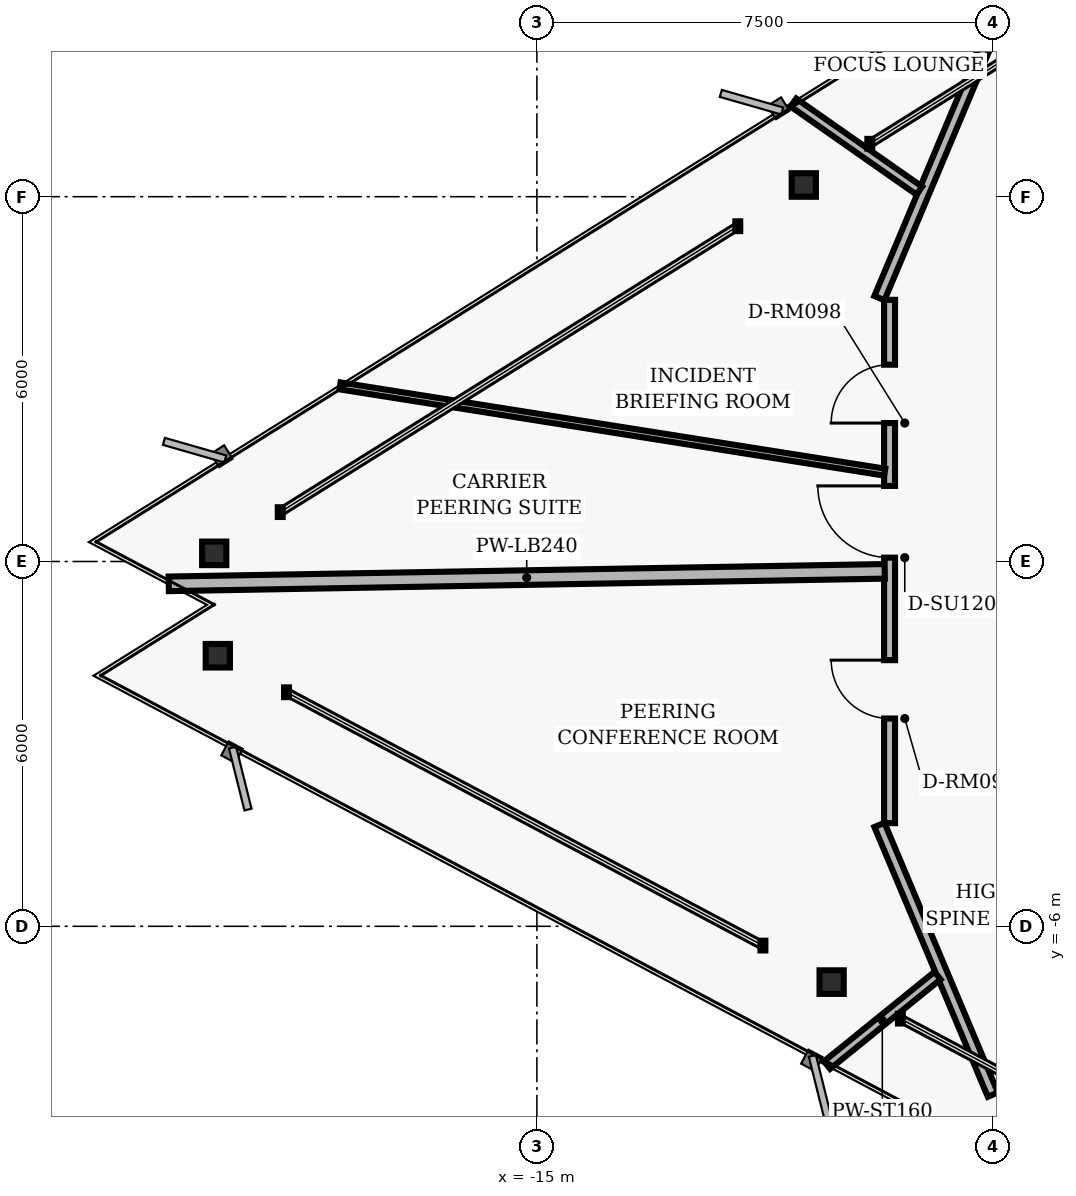
"""IFC4 building model, lengths in metres.
Left out: names, types, materials, properties, quantities, classifications, styles, units other than length and angle.
Written with IfcOpenShell. Run it as: python <this file> out.ifc"""

import sys

from ifc_helpers import new_model, si_unit, direction, frame, frame_2d, origin, origin_2d, place, context, subcontext, project, spatial, rectangle, i_section, extrude, element, fill, save


model = new_model("IFC4")
c1 = context("Model", 3, precision=1e-05, world=origin(), true_north=direction((0.0, 1.0)))
c2 = subcontext(c1, "Body", "Model", "MODEL_VIEW")
j1 = project(units=[si_unit("LENGTHUNIT", "METRE"), si_unit("PLANEANGLEUNIT", "RADIAN")], contexts=[c1])
p1 = place(None, origin())
s1 = spatial("IfcSite", under=j1, at=p1, CompositionType="ELEMENT")
p2 = place(p1, origin())
s2 = spatial("IfcBuilding", under=s1, at=p2, CompositionType="ELEMENT")
p3 = place(p2, frame((0.0, 0.0, 193.6)))
s3 = spatial("IfcBuildingStorey", under=s2, at=p3, CompositionType="ELEMENT", Elevation=193.6)
for number, where, z_axis, x_axis in (
    (1, (-10.611, 6.193, 0.0), (0.0, 0.0, 1.0), (1.0, 0.0, 0.0)),
    (2, (-20.307, 0.134, 0.0), (0.0, 0.0, 1.0), (1.0, 0.0, 0.0)),
    (3, (-20.248, -1.55, 0.0), (0.0, 0.0, 1.0), (1.0, 0.0, 0.0)),
    (4, (-10.153, -6.918, 0.0), (0.0, 0.0, 1.0), (1.0, 0.0, 0.0)),
):
    element("IfcColumn", number, at=place(p3, frame(where, z_axis=z_axis, x_axis=x_axis)), inside=s3, PredefinedType="COLUMN", context=c2, shape_type="SweptSolid", body=[
        extrude(i_section(OverallWidth=0.398, OverallDepth=0.387, WebThickness=0.021, FlangeThickness=0.033, FilletRadius=0.018, at=origin_2d()), origin(), (0.0, 0.0, 1.0), 3.04),
    ])
p4 = place(p3, frame((-7.501, -8.769, 0.0), z_axis=(0.0, 0.0, 1.0), x_axis=(-0.387573945081, 0.921838617706, 0.0)))
e5 = element("IfcWall", 5, at=p4, inside=s3, PredefinedType="PARTITIONING", context=c2, shape_type="SweptSolid", body=[
    extrude(rectangle(XDim=4.813, YDim=0.18, at=frame_2d((2.407, 0.0))), origin(), (0.0, 0.0, 1.0), 2.773),
])
p5 = place(p3, frame((-9.2, -4.303, 0.0), z_axis=(0.0, 0.0, 1.0), x_axis=(0.0, 1.0, 0.0)))
e6 = element("IfcWall", 6, at=p5, inside=s3, PredefinedType="PARTITIONING", context=c2, shape_type="SweptSolid", body=[
    extrude(rectangle(XDim=8.607, YDim=0.18, at=frame_2d((4.303, 0.0))), origin(), (0.0, 0.0, 1.0), 2.773),
])
p6 = place(p5, frame((1.721, 0.0, 0.0)))
e7 = element("IfcOpeningElement", 7, at=p6, cuts=e6, PredefinedType="OPENING", context=c2, shape_type="SweptSolid", body=[
    extrude(rectangle(XDim=0.96, YDim=2.02, at=frame_2d((0.48, 1.01))), frame((0.0, 0.1, 0.0), z_axis=(0.0, -1.0, 0.0), x_axis=(1.0, 0.0, 0.0)), (0.0, 0.0, 1.0), 0.2),
])
p7 = place(p5, frame((6.58, 0.0, 0.0)))
e8 = element("IfcOpeningElement", 8, at=p7, cuts=e6, PredefinedType="OPENING", context=c2, shape_type="SweptSolid", body=[
    extrude(rectangle(XDim=0.96, YDim=2.02, at=frame_2d((0.48, 1.01))), frame((0.0, 0.1, 0.0), z_axis=(0.0, -1.0, 0.0), x_axis=(1.0, 0.0, 0.0)), (0.0, 0.0, 1.0), 0.2),
])
p8 = place(p5, frame((4.367, 0.0, 0.0)))
e9 = element("IfcOpeningElement", 9, at=p8, cuts=e6, PredefinedType="OPENING", context=c2, shape_type="SweptSolid", body=[
    extrude(rectangle(XDim=1.18, YDim=2.02, at=frame_2d((0.59, 1.01))), frame((0.0, 0.1, 0.0), z_axis=(0.0, -1.0, 0.0), x_axis=(1.0, 0.0, 0.0)), (0.0, 0.0, 1.0), 0.2),
])
p9 = place(p3, frame((-9.367, 4.332, 0.0), z_axis=(0.0, 0.0, 1.0), x_axis=(0.387573945081, 0.921838617706, 0.0)))
e10 = element("IfcWall", 10, at=p9, inside=s3, PredefinedType="PARTITIONING", context=c2, shape_type="SweptSolid", body=[
    extrude(rectangle(XDim=4.813, YDim=0.18, at=frame_2d((2.407, 0.0))), origin(), (0.0, 0.0, 1.0), 2.773),
])
p10 = place(p3, frame((-9.28, -0.162, 0.0), z_axis=(0.0, 0.0, 1.0), x_axis=(-0.999847998997, -0.017434990714, 0.0)))
e11 = element("IfcWall", 11, at=p10, inside=s3, PredefinedType="PARTITIONING", context=c2, shape_type="SweptSolid", body=[
    extrude(rectangle(XDim=11.776, YDim=0.24, at=frame_2d((5.888, 0.0))), origin(), (0.0, 0.0, 1.0), 2.253),
])
p11 = place(p3, frame((-8.411, -6.811, 0.0), z_axis=(0.0, 0.0, 1.0), x_axis=(-0.777176762159, -0.629282353448, 0.0)))
e12 = element("IfcWall", 12, at=p11, inside=s3, PredefinedType="PARTITIONING", context=c2, shape_type="SweptSolid", body=[
    extrude(rectangle(XDim=2.337, YDim=0.16, at=frame_2d((1.169, 0.0))), origin(), (0.0, 0.0, 1.0), 2.773),
])
p12 = place(p3, frame((-8.71, 6.099, 0.0), z_axis=(0.0, 0.0, 1.0), x_axis=(-0.819154754917, 0.573572565154, 0.0)))
e13 = element("IfcWall", 13, at=p12, inside=s3, PredefinedType="PARTITIONING", context=c2, shape_type="SweptSolid", body=[
    extrude(rectangle(XDim=2.527, YDim=0.16, at=frame_2d((1.264, 0.0))), origin(), (0.0, 0.0, 1.0), 2.773),
])
p13 = place(p3, frame((-9.28, 1.47, 0.0), z_axis=(0.0, 0.0, 1.0), x_axis=(-0.987686019225, 0.156449120891, 0.0)))
e14 = element("IfcWall", 14, at=p13, inside=s3, PredefinedType="MOVABLE", context=c2, shape_type="SweptSolid", body=[
    extrude(rectangle(XDim=9.07, YDim=0.115, at=frame_2d((4.535, 0.0))), origin(), (0.0, 0.0, 1.0), 2.773),
])
p14 = place(p6, origin())
e15 = element("IfcDoor", 15, at=p14, inside=s3, OperationType="SINGLE_SWING_RIGHT", PredefinedType="DOOR", context=c2, shape_type="SweptSolid", body=[
    extrude(rectangle(XDim=0.96, YDim=2.02, at=frame_2d((0.48, 1.01))), frame((0.0, 0.025, 0.0), z_axis=(0.0, -1.0, 0.0), x_axis=(1.0, 0.0, 0.0)), (0.0, 0.0, 1.0), 0.05),
])
fill(e7, e15)
p15 = place(p7, origin())
e16 = element("IfcDoor", 16, at=p15, inside=s3, OperationType="SINGLE_SWING_LEFT", PredefinedType="DOOR", context=c2, shape_type="SweptSolid", body=[
    extrude(rectangle(XDim=0.96, YDim=2.02, at=frame_2d((0.48, 1.01))), frame((0.0, 0.025, 0.0), z_axis=(0.0, -1.0, 0.0), x_axis=(1.0, 0.0, 0.0)), (0.0, 0.0, 1.0), 0.05),
])
fill(e8, e16)
p16 = place(p8, origin())
e17 = element("IfcDoor", 17, at=p16, inside=s3, OperationType="SINGLE_SWING_RIGHT", PredefinedType="DOOR", context=c2, shape_type="SweptSolid", body=[
    extrude(rectangle(XDim=1.18, YDim=2.02, at=frame_2d((0.59, 1.01))), frame((0.0, 0.025, 0.0), z_axis=(0.0, -1.0, 0.0), x_axis=(1.0, 0.0, 0.0)), (0.0, 0.0, 1.0), 0.05),
])
fill(e9, e17)
save(model, sys.argv[1])
